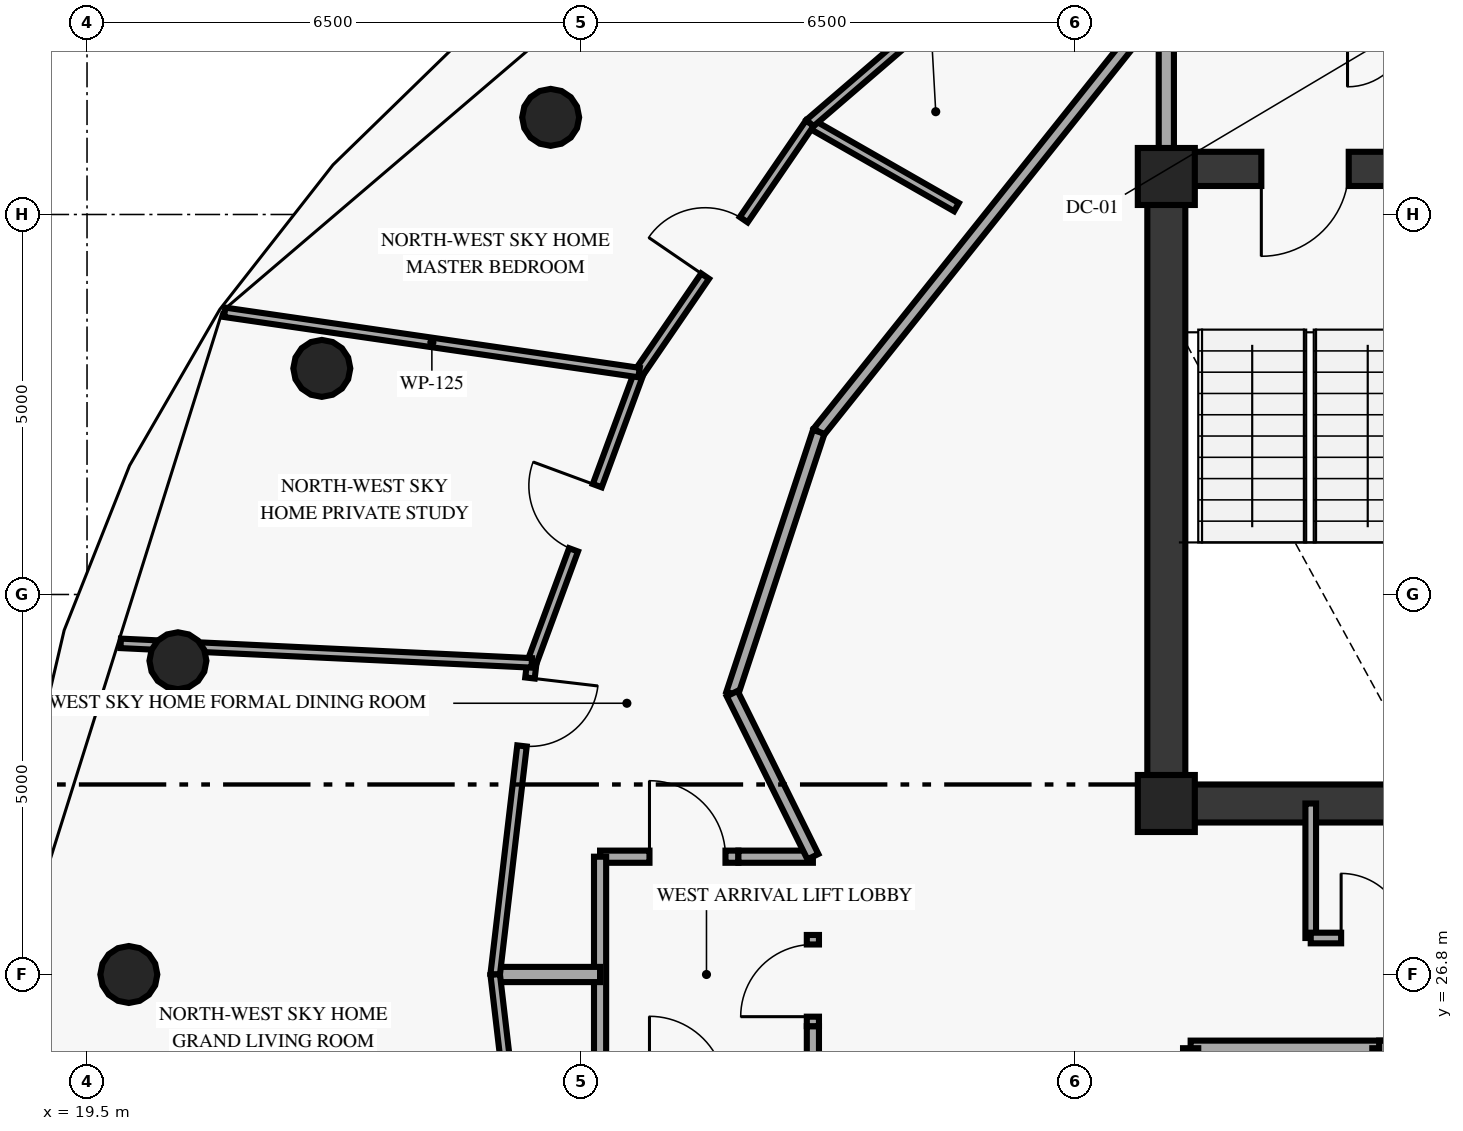
"""IFC4 building model, lengths in metres.
Left out: names, types, materials, properties, quantities, classifications, styles, units other than length and angle.
Written with IfcOpenShell. Run it as: python <this file> out.ifc"""

import sys

from ifc_helpers import new_model, si_unit, direction, frame, frame_2d, origin, origin_2d, place, context, subcontext, project, spatial, rectangle, circle, extrude, element, fill, save


model = new_model("IFC4")
c1 = context("Model", 3, precision=1e-05, world=origin(), true_north=direction((0.0, 1.0)))
c2 = subcontext(c1, "Body", "Model", "MODEL_VIEW")
j1 = project(units=[si_unit("LENGTHUNIT", "METRE"), si_unit("PLANEANGLEUNIT", "RADIAN")], contexts=[c1])
p1 = place(None, origin())
s1 = spatial("IfcSite", under=j1, at=p1, CompositionType="ELEMENT")
p2 = place(p1, origin())
s2 = spatial("IfcBuilding", under=s1, at=p2, CompositionType="ELEMENT")
p3 = place(p2, frame((0.0, 0.0, 255.6)))
s3 = spatial("IfcBuildingStorey", under=s2, at=p3, CompositionType="ELEMENT", Elevation=255.6)
for number, where, z_axis, x_axis in (
    (1, (33.7, 37.3, 0.0), (0.0, 0.0, 1.0), (1.0, 0.0, 0.0)),
    (2, (33.7, 29.05, 0.0), (0.0, 0.0, 1.0), (1.0, 0.0, 0.0)),
):
    element("IfcColumn", number, at=place(p3, frame(where, z_axis=z_axis, x_axis=x_axis)), inside=s3, PredefinedType="PILASTER", context=c2, shape_type="SweptSolid", body=[
        extrude(rectangle(XDim=0.75, YDim=0.75, at=origin_2d()), origin(), (0.0, 0.0, 1.0), 3.54),
    ])
for number, where, z_axis, x_axis in (
    (3, (25.6, 38.078, 0.0), (0.0, 0.0, 1.0), (1.0, 0.0, 0.0)),
    (4, (22.589, 34.775, 0.0), (0.0, 0.0, 1.0), (1.0, 0.0, 0.0)),
    (5, (20.696, 30.928, 0.0), (0.0, 0.0, 1.0), (1.0, 0.0, 0.0)),
    (6, (20.05, 26.8, 0.0), (0.0, 0.0, 1.0), (1.0, 0.0, 0.0)),
):
    element("IfcColumn", number, at=place(p3, frame(where, z_axis=z_axis, x_axis=x_axis)), inside=s3, PredefinedType="COLUMN", context=c2, shape_type="SweptSolid", body=[
        extrude(circle(Radius=0.375, at=origin_2d()), origin(), (0.0, 0.0, 1.0), 3.54),
    ])
p4 = place(p3, frame((33.7, 29.05, 0.0), z_axis=(0.0, 0.0, 1.0), x_axis=(0.0, 1.0, 0.0)))
e7 = element("IfcWall", 7, at=p4, inside=s3, PredefinedType="SHEAR", context=c2, shape_type="SweptSolid", body=[
    extrude(rectangle(XDim=8.35, YDim=0.5, at=frame_2d((4.175, 0.0))), origin(), (0.0, 0.0, 1.0), 3.54),
])
p5 = place(p3, frame((33.7, 29.05, 0.0), z_axis=(0.0, 0.0, 1.0), x_axis=(1.0, 0.0, 0.0)))
e8 = element("IfcWall", 8, at=p5, inside=s3, PredefinedType="SHEAR", context=c2, shape_type="SweptSolid", body=[
    extrude(rectangle(XDim=10.6, YDim=0.5, at=frame_2d((5.3, 0.0))), origin(), (0.0, 0.0, 1.0), 3.54),
])
p6 = place(p3, frame((37.35, 37.4, 0.0), z_axis=(0.0, 0.0, 1.0), x_axis=(-1.0, 0.0, 0.0)))
e9 = element("IfcWall", 9, at=p6, inside=s3, PredefinedType="SHEAR", context=c2, shape_type="SweptSolid", body=[
    extrude(rectangle(XDim=3.65, YDim=0.45, at=frame_2d((1.825, 0.0))), origin(), (0.0, 0.0, 1.0), 3.54),
])
p7 = place(p6, frame((1.25, 0.0, 0.0)))
e10 = element("IfcOpeningElement", 10, at=p7, cuts=e9, PredefinedType="OPENING", context=c2, shape_type="SweptSolid", body=[
    extrude(rectangle(XDim=1.15, YDim=2.15, at=frame_2d((0.575, 1.075))), frame((0.0, 0.235, 0.0), z_axis=(0.0, -1.0, 0.0), x_axis=(1.0, 0.0, 0.0)), (0.0, 0.0, 1.0), 0.47),
])
p8 = place(p3, frame((33.7, 37.4, 0.0), z_axis=(0.0, 0.0, 1.0), x_axis=(0.0, 1.0, 0.0)))
e11 = element("IfcWall", 11, at=p8, inside=s3, PredefinedType="SOLIDWALL", context=c2, shape_type="SweptSolid", body=[
    extrude(rectangle(XDim=1.88, YDim=0.2, at=frame_2d((0.94, 0.0))), origin(), (0.0, 0.0, 1.0), 3.54),
])
p9 = place(p3, frame((35.6, 27.28, 0.0), z_axis=(0.0, 0.0, 1.0), x_axis=(0.0, 1.0, 0.0)))
e12 = element("IfcWall", 12, at=p9, inside=s3, PredefinedType="PARTITIONING", context=c2, shape_type="SweptSolid", body=[
    extrude(rectangle(XDim=1.77, YDim=0.14, at=frame_2d((0.885, 0.0))), origin(), (0.0, 0.0, 1.0), 3.54),
])
p10 = place(p3, frame((34.02, 25.83, 0.0), z_axis=(0.0, 0.0, 1.0), x_axis=(1.0, 0.0, 0.0)))
e13 = element("IfcWall", 13, at=p10, inside=s3, PredefinedType="SOLIDWALL", context=c2, shape_type="SweptSolid", body=[
    extrude(rectangle(XDim=2.5, YDim=0.2, at=frame_2d((1.25, 0.0))), origin(), (0.0, 0.0, 1.0), 3.54),
])
for number, where, z_axis, x_axis in (
    (14, (34.02, 23.42, 0.0), (0.0, 0.0, 1.0), (0.0, 1.0, 0.0)),
    (15, (36.51, 23.42, 0.0), (0.0, 0.0, 1.0), (0.0, 1.0, 0.0)),
):
    element("IfcWall", number, at=place(p3, frame(where, z_axis=z_axis, x_axis=x_axis)), inside=s3, PredefinedType="SOLIDWALL", context=c2, shape_type="SweptSolid", body=[
        extrude(rectangle(XDim=2.41, YDim=0.2, at=frame_2d((1.205, 0.0))), origin(), (0.0, 0.0, 1.0), 3.54),
    ])
p11 = place(p3, frame((36.5, 25.83, 0.0), z_axis=(0.0, 0.0, 1.0), x_axis=(1.0, 0.0, 0.0)))
e16 = element("IfcWall", 16, at=p11, inside=s3, PredefinedType="SOLIDWALL", context=c2, shape_type="SweptSolid", body=[
    extrude(rectangle(XDim=2.5, YDim=0.2, at=frame_2d((1.25, 0.0))), origin(), (0.0, 0.0, 1.0), 3.54),
])
p12 = place(p3, frame((29.05, 19.05, 0.0), z_axis=(0.0, 0.0, 1.0), x_axis=(0.0, 1.0, 0.0)))
e17 = element("IfcWall", 17, at=p12, inside=s3, PredefinedType="PARTITIONING", context=c2, shape_type="SweptSolid", body=[
    extrude(rectangle(XDim=7.07, YDim=0.16, at=frame_2d((3.535, 0.0))), origin(), (0.0, 0.0, 1.0), 3.54),
])
p13 = place(p3, frame((29.05, 26.12, 0.0), z_axis=(0.0, 0.0, 1.0), x_axis=(0.0, 1.0, 0.0)))
e18 = element("IfcWall", 18, at=p13, inside=s3, PredefinedType="PARTITIONING", context=c2, shape_type="SweptSolid", body=[
    extrude(rectangle(XDim=1.2, YDim=0.16, at=frame_2d((0.6, 0.0))), origin(), (0.0, 0.0, 1.0), 3.54),
])
p14 = place(p13, frame((0.125, 0.0, 0.0)))
e19 = element("IfcOpeningElement", 19, at=p14, cuts=e18, PredefinedType="OPENING", context=c2, shape_type="SweptSolid", body=[
    extrude(rectangle(XDim=0.95, YDim=2.15, at=frame_2d((0.475, 1.075))), frame((0.0, 0.09, 0.0), z_axis=(0.0, -1.0, 0.0), x_axis=(1.0, 0.0, 0.0)), (0.0, 0.0, 1.0), 0.18),
])
p15 = place(p3, frame((35.6, 27.28, 0.0), z_axis=(0.0, 0.0, 1.0), x_axis=(1.0, 0.0, 0.0)))
e20 = element("IfcWall", 20, at=p15, inside=s3, PredefinedType="PARTITIONING", context=c2, shape_type="SweptSolid", body=[
    extrude(rectangle(XDim=5.4, YDim=0.14, at=frame_2d((2.7, 0.0))), origin(), (0.0, 0.0, 1.0), 3.54),
])
p16 = place(p15, frame((0.4, 0.0, 0.0)))
e21 = element("IfcOpeningElement", 21, at=p16, cuts=e20, PredefinedType="OPENING", context=c2, shape_type="SweptSolid", body=[
    extrude(rectangle(XDim=0.85, YDim=2.1, at=frame_2d((0.425, 1.05))), frame((0.0, 0.08, 0.0), z_axis=(0.0, -1.0, 0.0), x_axis=(1.0, 0.0, 0.0)), (0.0, 0.0, 1.0), 0.16),
])
p17 = place(p15, frame((2.25, 0.0, 0.0)))
e22 = element("IfcOpeningElement", 22, at=p17, cuts=e20, PredefinedType="OPENING", context=c2, shape_type="SweptSolid", body=[
    extrude(rectangle(XDim=0.95, YDim=2.1, at=frame_2d((0.475, 1.05))), frame((0.0, 0.08, 0.0), z_axis=(0.0, -1.0, 0.0), x_axis=(1.0, 0.0, 0.0)), (0.0, 0.0, 1.0), 0.16),
])
p18 = place(p15, frame((4.2, 0.0, 0.0)))
e23 = element("IfcOpeningElement", 23, at=p18, cuts=e20, PredefinedType="OPENING", context=c2, shape_type="SweptSolid", body=[
    extrude(rectangle(XDim=0.8, YDim=2.05, at=frame_2d((0.4, 1.025))), frame((0.0, 0.08, 0.0), z_axis=(0.0, -1.0, 0.0), x_axis=(1.0, 0.0, 0.0)), (0.0, 0.0, 1.0), 0.16),
])
p19 = place(p3, frame((33.3, 39.167, 0.0), z_axis=(0.0, 0.0, 1.0), x_axis=(-0.623915746766, -0.781491612839, 0.0)))
e24 = element("IfcWall", 24, at=p19, inside=s3, PredefinedType="PARTITIONING", context=c2, shape_type="SweptSolid", body=[
    extrude(rectangle(XDim=6.688, YDim=0.16, at=frame_2d((3.344, 0.0))), origin(), (0.0, 0.0, 1.0), 3.54),
])
p20 = place(p3, frame((29.127, 33.94, 0.0), z_axis=(0.0, 0.0, 1.0), x_axis=(-0.313985571683, -0.949427754374, 0.0)))
e25 = element("IfcWall", 25, at=p20, inside=s3, PredefinedType="PARTITIONING", context=c2, shape_type="SweptSolid", body=[
    extrude(rectangle(XDim=3.627, YDim=0.16, at=frame_2d((1.813, 0.0))), origin(), (0.0, 0.0, 1.0), 3.54),
])
p21 = place(p3, frame((26.25, 28.35, 0.0), z_axis=(0.0, 0.0, 1.0), x_axis=(1.0, 0.0, 0.0)))
e26 = element("IfcWall", 26, at=p21, inside=s3, PredefinedType="PARTITIONING", context=c2, shape_type="SweptSolid", body=[
    extrude(rectangle(XDim=1.82, YDim=0.16, at=frame_2d((0.91, 0.0))), origin(), (0.0, 0.0, 1.0), 3.54),
])
p22 = place(p21, frame((0.65, 0.0, 0.0)))
e27 = element("IfcOpeningElement", 27, at=p22, cuts=e26, PredefinedType="OPENING", context=c2, shape_type="SweptSolid", body=[
    extrude(rectangle(XDim=1.0, YDim=2.15, at=frame_2d((0.5, 1.075))), frame((0.0, 0.09, 0.0), z_axis=(0.0, -1.0, 0.0), x_axis=(1.0, 0.0, 0.0)), (0.0, 0.0, 1.0), 0.18),
])
p23 = place(p3, frame((28.07, 28.35, 0.0), z_axis=(0.0, 0.0, 1.0), x_axis=(1.0, 0.0, 0.0)))
e28 = element("IfcWall", 28, at=p23, inside=s3, PredefinedType="PARTITIONING", context=c2, shape_type="SweptSolid", body=[
    extrude(rectangle(XDim=0.98, YDim=0.16, at=frame_2d((0.49, 0.0))), origin(), (0.0, 0.0, 1.0), 2.68),
])
p24 = place(p3, frame((26.25, 25.25, 0.0), z_axis=(0.0, 0.0, 1.0), x_axis=(0.0, 1.0, 0.0)))
e29 = element("IfcWall", 29, at=p24, inside=s3, PredefinedType="PARTITIONING", context=c2, shape_type="SweptSolid", body=[
    extrude(rectangle(XDim=3.1, YDim=0.16, at=frame_2d((1.55, 0.0))), origin(), (0.0, 0.0, 1.0), 3.54),
])
p25 = place(p3, frame((27.988, 30.496, 0.0), z_axis=(0.0, 0.0, 1.0), x_axis=(0.443539160525, -0.896254993337, 0.0)))
e30 = element("IfcWall", 30, at=p25, inside=s3, PredefinedType="PARTITIONING", context=c2, shape_type="SweptSolid", body=[
    extrude(rectangle(XDim=2.394, YDim=0.16, at=frame_2d((1.197, 0.0))), origin(), (0.0, 0.0, 1.0), 3.54),
])
p26 = place(p3, frame((26.25, 26.8, 0.0), z_axis=(0.0, 0.0, 1.0), x_axis=(-1.0, 0.0, 0.0)))
e31 = element("IfcWall", 31, at=p26, inside=s3, PredefinedType="PARTITIONING", context=c2, shape_type="SweptSolid", body=[
    extrude(rectangle(XDim=1.38, YDim=0.2, at=frame_2d((0.69, 0.0))), origin(), (0.0, 0.0, 1.0), 3.54),
])
p27 = place(p3, frame((30.939, 36.897, 0.0), z_axis=(0.0, 0.0, 1.0), x_axis=(-0.868013301924, 0.496540942606, 0.0)))
e32 = element("IfcWall", 32, at=p27, inside=s3, PredefinedType="PARTITIONING", context=c2, shape_type="SweptSolid", body=[
    extrude(rectangle(XDim=2.223, YDim=0.125, at=frame_2d((1.112, 0.0))), origin(), (0.0, 0.0, 1.0), 3.54),
])
p28 = place(p3, frame((29.009, 38.001, 0.0), z_axis=(0.0, 0.0, 1.0), x_axis=(0.758094504626, 0.652144709444, 0.0)))
e33 = element("IfcWall", 33, at=p28, inside=s3, PredefinedType="PARTITIONING", context=c2, shape_type="SweptSolid", body=[
    extrude(rectangle(XDim=3.86, YDim=0.125, at=frame_2d((1.93, 0.0))), origin(), (0.0, 0.0, 1.0), 3.54),
])
p29 = place(p28, frame((2.76, 0.0, 0.0)))
e34 = element("IfcOpeningElement", 34, at=p29, cuts=e33, PredefinedType="OPENING", context=c2, shape_type="SweptSolid", body=[
    extrude(rectangle(XDim=0.9, YDim=2.1, at=frame_2d((0.45, 1.05))), frame((0.0, 0.073, 0.0), z_axis=(0.0, -1.0, 0.0), x_axis=(1.0, 0.0, 0.0)), (0.0, 0.0, 1.0), 0.145),
])
p30 = place(p3, frame((26.763, 34.72, 0.0), z_axis=(0.0, 0.0, 1.0), x_axis=(0.564888606623, 0.825167172219, 0.0)))
e35 = element("IfcWall", 35, at=p30, inside=s3, PredefinedType="PARTITIONING", context=c2, shape_type="SweptSolid", body=[
    extrude(rectangle(XDim=3.976, YDim=0.125, at=frame_2d((1.988, 0.0))), origin(), (0.0, 0.0, 1.0), 3.54),
])
p31 = place(p30, frame((1.538, 0.0, 0.0)))
e36 = element("IfcOpeningElement", 36, at=p31, cuts=e35, PredefinedType="OPENING", context=c2, shape_type="SweptSolid", body=[
    extrude(rectangle(XDim=0.9, YDim=2.1, at=frame_2d((0.45, 1.05))), frame((0.0, 0.073, 0.0), z_axis=(0.0, -1.0, 0.0), x_axis=(1.0, 0.0, 0.0)), (0.0, 0.0, 1.0), 0.145),
])
p32 = place(p3, frame((25.351, 30.9, 0.0), z_axis=(0.0, 0.0, 1.0), x_axis=(0.346671925992, 0.937986447519, 0.0)))
e37 = element("IfcWall", 37, at=p32, inside=s3, PredefinedType="PARTITIONING", context=c2, shape_type="SweptSolid", body=[
    extrude(rectangle(XDim=4.073, YDim=0.125, at=frame_2d((2.036, 0.0))), origin(), (0.0, 0.0, 1.0), 3.54),
])
p33 = place(p32, frame((1.586, 0.0, 0.0)))
e38 = element("IfcOpeningElement", 38, at=p33, cuts=e37, PredefinedType="OPENING", context=c2, shape_type="SweptSolid", body=[
    extrude(rectangle(XDim=0.9, YDim=2.1, at=frame_2d((0.45, 1.05))), frame((0.0, 0.073, 0.0), z_axis=(0.0, -1.0, 0.0), x_axis=(1.0, 0.0, 0.0)), (0.0, 0.0, 1.0), 0.145),
])
p34 = place(p3, frame((24.87, 26.8, 0.0), z_axis=(0.0, 0.0, 1.0), x_axis=(0.116511816348, 0.993189305546, 0.0)))
e39 = element("IfcWall", 39, at=p34, inside=s3, PredefinedType="PARTITIONING", context=c2, shape_type="SweptSolid", body=[
    extrude(rectangle(XDim=4.128, YDim=0.125, at=frame_2d((2.064, 0.0))), origin(), (0.0, 0.0, 1.0), 3.54),
])
p35 = place(p34, frame((3.028, 0.0, 0.0)))
e40 = element("IfcOpeningElement", 40, at=p35, cuts=e39, PredefinedType="OPENING", context=c2, shape_type="SweptSolid", body=[
    extrude(rectangle(XDim=0.9, YDim=2.1, at=frame_2d((0.45, 1.05))), frame((0.0, 0.073, 0.0), z_axis=(0.0, -1.0, 0.0), x_axis=(1.0, 0.0, 0.0)), (0.0, 0.0, 1.0), 0.145),
])
p36 = place(p3, frame((24.87, 26.8, 0.0), z_axis=(0.0, 0.0, 1.0), x_axis=(0.116504972814, -0.993190108343, 0.0)))
e41 = element("IfcWall", 41, at=p36, inside=s3, PredefinedType="PARTITIONING", context=c2, shape_type="SweptSolid", body=[
    extrude(rectangle(XDim=4.128, YDim=0.125, at=frame_2d((2.064, 0.0))), origin(), (0.0, 0.0, 1.0), 3.54),
])
p37 = place(p3, frame((26.763, 34.72, 0.0), z_axis=(0.0, 0.0, 1.0), x_axis=(-0.989587357403, 0.143933533511, 0.0)))
e42 = element("IfcWall", 42, at=p37, inside=s3, PredefinedType="PARTITIONING", context=c2, shape_type="SweptSolid", body=[
    extrude(rectangle(XDim=5.509, YDim=0.125, at=frame_2d((2.755, 0.0))), origin(), (0.0, 0.0, 1.0), 3.54),
])
p38 = place(p3, frame((25.351, 30.9, 0.0), z_axis=(0.0, 0.0, 1.0), x_axis=(-0.998872011246, 0.047483735626, 0.0)))
e43 = element("IfcWall", 43, at=p38, inside=s3, PredefinedType="PARTITIONING", context=c2, shape_type="SweptSolid", body=[
    extrude(rectangle(XDim=5.414, YDim=0.125, at=frame_2d((2.707, 0.0))), origin(), (0.0, 0.0, 1.0), 3.54),
])
p39 = place(p7, origin())
e44 = element("IfcDoor", 44, at=p39, inside=s3, OperationType="SINGLE_SWING_RIGHT", PredefinedType="DOOR", context=c2, shape_type="SweptSolid", body=[
    extrude(rectangle(XDim=1.15, YDim=2.15, at=frame_2d((0.575, 1.075))), frame((0.0, 0.025, 0.0), z_axis=(0.0, -1.0, 0.0), x_axis=(1.0, 0.0, 0.0)), (0.0, 0.0, 1.0), 0.05),
])
fill(e10, e44)
p40 = place(p14, origin())
e45 = element("IfcDoor", 45, at=p40, inside=s3, OperationType="SINGLE_SWING_RIGHT", PredefinedType="DOOR", context=c2, shape_type="SweptSolid", body=[
    extrude(rectangle(XDim=0.95, YDim=2.15, at=frame_2d((0.475, 1.075))), frame((0.0, 0.025, 0.0), z_axis=(0.0, -1.0, 0.0), x_axis=(1.0, 0.0, 0.0)), (0.0, 0.0, 1.0), 0.05),
])
fill(e19, e45)
p41 = place(p16, origin())
e46 = element("IfcDoor", 46, at=p41, inside=s3, OperationType="SINGLE_SWING_LEFT", PredefinedType="DOOR", context=c2, shape_type="SweptSolid", body=[
    extrude(rectangle(XDim=0.85, YDim=2.1, at=frame_2d((0.425, 1.05))), frame((0.0, 0.025, 0.0), z_axis=(0.0, -1.0, 0.0), x_axis=(1.0, 0.0, 0.0)), (0.0, 0.0, 1.0), 0.05),
])
fill(e21, e46)
p42 = place(p22, origin())
e47 = element("IfcDoor", 47, at=p42, inside=s3, OperationType="SINGLE_SWING_LEFT", PredefinedType="DOOR", context=c2, shape_type="SweptSolid", body=[
    extrude(rectangle(XDim=1.0, YDim=2.15, at=frame_2d((0.5, 1.075))), frame((0.0, 0.025, 0.0), z_axis=(0.0, -1.0, 0.0), x_axis=(1.0, 0.0, 0.0)), (0.0, 0.0, 1.0), 0.05),
])
fill(e27, e47)
p43 = place(p31, origin())
e48 = element("IfcDoor", 48, at=p43, inside=s3, OperationType="SINGLE_SWING_LEFT", PredefinedType="DOOR", context=c2, shape_type="SweptSolid", body=[
    extrude(rectangle(XDim=0.9, YDim=2.1, at=frame_2d((0.45, 1.05))), frame((0.0, 0.025, 0.0), z_axis=(0.0, -1.0, 0.0), x_axis=(1.0, 0.0, 0.0)), (0.0, 0.0, 1.0), 0.05),
])
fill(e36, e48)
p44 = place(p33, origin())
e49 = element("IfcDoor", 49, at=p44, inside=s3, OperationType="SINGLE_SWING_RIGHT", PredefinedType="DOOR", context=c2, shape_type="SweptSolid", body=[
    extrude(rectangle(XDim=0.9, YDim=2.1, at=frame_2d((0.45, 1.05))), frame((0.0, 0.025, 0.0), z_axis=(0.0, -1.0, 0.0), x_axis=(1.0, 0.0, 0.0)), (0.0, 0.0, 1.0), 0.05),
])
fill(e38, e49)
p45 = place(p35, origin())
e50 = element("IfcDoor", 50, at=p45, inside=s3, OperationType="SINGLE_SWING_RIGHT", PredefinedType="DOOR", context=c2, shape_type="SweptSolid", body=[
    extrude(rectangle(XDim=0.9, YDim=2.1, at=frame_2d((0.45, 1.05))), frame((0.0, 0.025, 0.0), z_axis=(0.0, -1.0, 0.0), x_axis=(1.0, 0.0, 0.0)), (0.0, 0.0, 1.0), 0.05),
])
fill(e40, e50)
save(model, sys.argv[1])
